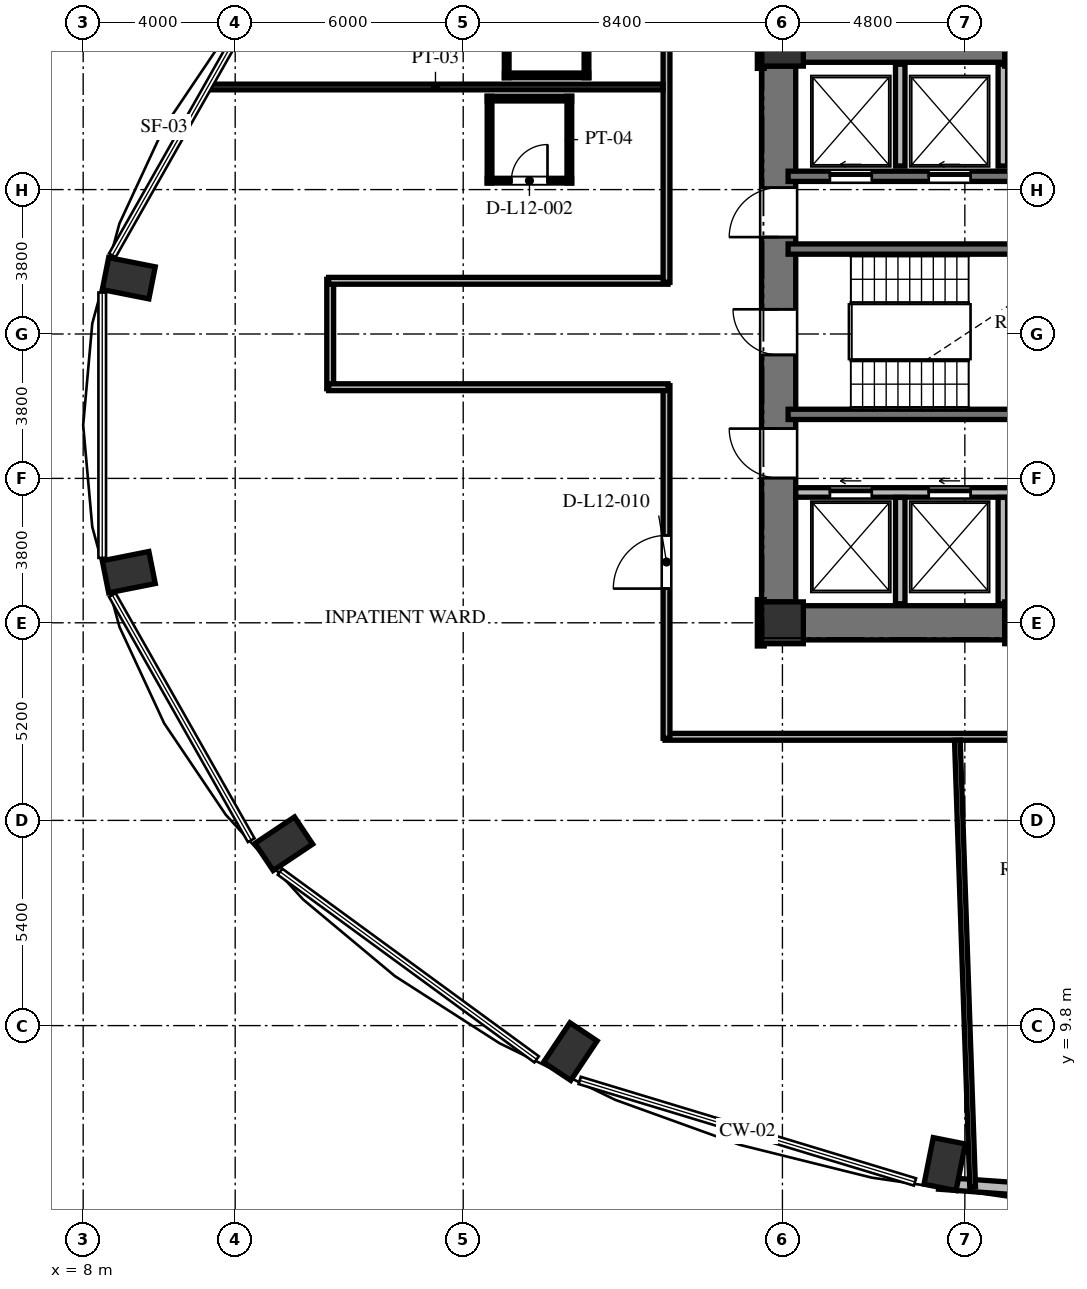
"""IFC4 building model, lengths in metres.
Left out: names, types, materials, properties, quantities, classifications, styles, units other than length and angle.
Written with IfcOpenShell. Run it as: python <this file> out.ifc"""

import sys

from ifc_helpers import new_model, si_unit, direction, frame, frame_2d, origin, origin_2d, place, context, subcontext, project, spatial, rectangle, extrude, element, fill, save


model = new_model("IFC4")
c1 = context("Model", 3, precision=1e-05, world=origin(), true_north=direction((0.0, 1.0)))
c2 = subcontext(c1, "Body", "Model", "MODEL_VIEW")
j1 = project(units=[si_unit("LENGTHUNIT", "METRE"), si_unit("PLANEANGLEUNIT", "RADIAN")], contexts=[c1])
p1 = place(None, origin())
s1 = spatial("IfcSite", under=j1, at=p1, CompositionType="ELEMENT")
p2 = place(p1, origin())
s2 = spatial("IfcBuilding", under=s1, at=p2, CompositionType="ELEMENT")
p3 = place(p2, frame((0.0, 0.0, 50.736)))
s3 = spatial("IfcBuildingStorey", under=s2, at=p3, CompositionType="ELEMENT", Elevation=50.736)
for number, where, z_axis, x_axis in (
    (1, (9.2, 29.468, 0.0), (0.0, 0.0, 1.0), (-0.981, 0.195, 0.0)),
    (2, (9.2, 21.732, 0.0), (0.0, 0.0, 1.0), (-0.981, -0.195, 0.0)),
    (3, (13.28, 14.586, 0.0), (0.0, 0.0, 1.0), (-0.831, -0.556, 0.0)),
    (4, (20.819, 9.116, 0.0), (0.0, 0.0, 1.0), (-0.556, -0.831, 0.0)),
    (5, (30.669, 6.156, 0.0), (0.0, 0.0, 1.0), (-0.195, -0.981, 0.0)),
):
    element("IfcColumn", number, at=place(p3, frame(where, z_axis=z_axis, x_axis=x_axis)), inside=s3, PredefinedType="COLUMN", context=c2, shape_type="SweptSolid", body=[
        extrude(rectangle(XDim=1.25, YDim=0.86, at=origin_2d()), origin(), (0.0, 0.0, 1.0), 3.648),
    ])
for number, where, z_axis, x_axis in (
    (6, (26.4, 20.4, 0.0), (0.0, 0.0, 1.0), (1.0, 0.0, 0.0)),
    (7, (32.8, 20.4, 0.0), (0.0, 0.0, 1.0), (1.0, 0.0, 0.0)),
    (8, (32.8, 35.6, 0.0), (0.0, 0.0, 1.0), (1.0, 0.0, 0.0)),
    (9, (26.4, 35.6, 0.0), (0.0, 0.0, 1.0), (1.0, 0.0, 0.0)),
):
    element("IfcColumn", number, at=place(p3, frame(where, z_axis=z_axis, x_axis=x_axis)), inside=s3, PredefinedType="COLUMN", context=c2, shape_type="SweptSolid", body=[
        extrude(rectangle(XDim=1.1, YDim=1.1, at=origin_2d()), origin(), (0.0, 0.0, 1.0), 3.648),
    ])
p4 = place(p3, frame((26.3, 20.95, 0.0), z_axis=(0.0, 0.0, 1.0), x_axis=(0.0, 1.0, 0.0)))
e10 = element("IfcWall", 10, at=p4, inside=s3, PredefinedType="SHEAR", context=c2, shape_type="SweptSolid", body=[
    extrude(rectangle(XDim=14.1, YDim=0.9, at=frame_2d((7.05, 0.0))), origin(), (0.0, 0.0, 1.0), 3.648),
])
p5 = place(p4, frame((6.5, 0.0, 0.0)))
e11 = element("IfcOpeningElement", 11, at=p5, cuts=e10, PredefinedType="OPENING", context=c2, shape_type="SweptSolid", body=[
    extrude(rectangle(XDim=1.2, YDim=2.15, at=frame_2d((0.6, 1.075))), frame((0.0, 0.46, 0.0), z_axis=(0.0, -1.0, 0.0), x_axis=(1.0, 0.0, 0.0)), (0.0, 0.0, 1.0), 0.92),
])
p6 = place(p4, frame((9.6, 0.0, 0.0)))
e12 = element("IfcOpeningElement", 12, at=p6, cuts=e10, PredefinedType="OPENING", context=c2, shape_type="SweptSolid", body=[
    extrude(rectangle(XDim=1.3, YDim=2.2, at=frame_2d((0.65, 1.1))), frame((0.0, 0.46, 0.0), z_axis=(0.0, -1.0, 0.0), x_axis=(1.0, 0.0, 0.0)), (0.0, 0.0, 1.0), 0.92),
])
p7 = place(p4, frame((3.26, 0.0, 0.0)))
e13 = element("IfcOpeningElement", 13, at=p7, cuts=e10, PredefinedType="OPENING", context=c2, shape_type="SweptSolid", body=[
    extrude(rectangle(XDim=1.3, YDim=2.2, at=frame_2d((0.65, 1.1))), frame((0.0, 0.46, 0.0), z_axis=(0.0, -1.0, 0.0), x_axis=(1.0, 0.0, 0.0)), (0.0, 0.0, 1.0), 0.92),
])
for number, where, z_axis, x_axis in (
    (14, (26.95, 20.4, 0.0), (0.0, 0.0, 1.0), (1.0, 0.0, 0.0)),
    (15, (26.95, 35.6, 0.0), (0.0, 0.0, 1.0), (1.0, 0.0, 0.0)),
):
    element("IfcWall", number, at=place(p3, frame(where, z_axis=z_axis, x_axis=x_axis)), inside=s3, PredefinedType="SHEAR", context=c2, shape_type="SweptSolid", body=[
        extrude(rectangle(XDim=5.3, YDim=0.9, at=frame_2d((2.65, 0.0))), origin(), (0.0, 0.0, 1.0), 3.648),
    ])
p8 = place(p3, frame((30.519, 5.654, 0.0), z_axis=(0.0, 0.0, 1.0), x_axis=(0.997421878774, -0.071760683825, 0.0)))
e16 = element("IfcWall", 16, at=p8, inside=s3, PredefinedType="SOLIDWALL", context=c2, shape_type="SweptSolid", body=[
    extrude(rectangle(XDim=5.675, YDim=0.32, at=frame_2d((2.837, 0.0))), origin(), (0.0, 0.0, 1.0), 3.428),
])
p9 = place(p8, frame((2.237, 0.0, 0.85)))
e17 = element("IfcOpeningElement", 17, at=p9, cuts=e16, PredefinedType="OPENING", context=c2, shape_type="SweptSolid", body=[
    extrude(rectangle(XDim=1.2, YDim=2.2, at=frame_2d((0.6, 1.1))), frame((0.0, 0.17, 0.0), z_axis=(0.0, -1.0, 0.0), x_axis=(1.0, 0.0, 0.0)), (0.0, 0.0, 1.0), 0.34),
])
for number, where, z_axis, x_axis in (
    (18, (26.55, 30.235, 0.0), (0.0, 0.0, 1.0), (1.0, 0.0, 0.0)),
    (19, (26.55, 25.885, 0.0), (0.0, 0.0, 1.0), (1.0, 0.0, 0.0)),
):
    element("IfcWall", number, at=place(p3, frame(where, z_axis=z_axis, x_axis=x_axis)), inside=s3, PredefinedType="SHEAR", context=c2, shape_type="SweptSolid", body=[
        extrude(rectangle(XDim=7.985, YDim=0.27, at=frame_2d((3.992, 0.0))), origin(), (0.0, 0.0, 1.0), 3.648),
    ])
p10 = place(p3, frame((26.55, 32.15, 0.0), z_axis=(0.0, 0.0, 1.0), x_axis=(1.0, 0.0, 0.0)))
e20 = element("IfcWall", 20, at=p10, inside=s3, PredefinedType="SHEAR", context=c2, shape_type="SweptSolid", body=[
    extrude(rectangle(XDim=16.4, YDim=0.27, at=frame_2d((8.2, 0.0))), origin(), (0.0, 0.0, 1.0), 3.648),
])
p11 = place(p10, frame((1.1, 0.0, 0.0)))
e21 = element("IfcOpeningElement", 21, at=p11, cuts=e20, PredefinedType="OPENING", context=c2, shape_type="SweptSolid", body=[
    extrude(rectangle(XDim=1.1, YDim=2.2, at=frame_2d((0.55, 1.1))), frame((0.0, 0.145, 0.0), z_axis=(0.0, -1.0, 0.0), x_axis=(1.0, 0.0, 0.0)), (0.0, 0.0, 1.0), 0.29),
])
p12 = place(p10, frame((3.7, 0.0, 0.0)))
e22 = element("IfcOpeningElement", 22, at=p12, cuts=e20, PredefinedType="OPENING", context=c2, shape_type="SweptSolid", body=[
    extrude(rectangle(XDim=1.1, YDim=2.2, at=frame_2d((0.55, 1.1))), frame((0.0, 0.145, 0.0), z_axis=(0.0, -1.0, 0.0), x_axis=(1.0, 0.0, 0.0)), (0.0, 0.0, 1.0), 0.29),
])
p13 = place(p10, frame((6.5, 0.0, 0.0)))
e23 = element("IfcOpeningElement", 23, at=p13, cuts=e20, PredefinedType="OPENING", context=c2, shape_type="SweptSolid", body=[
    extrude(rectangle(XDim=1.1, YDim=2.2, at=frame_2d((0.55, 1.1))), frame((0.0, 0.145, 0.0), z_axis=(0.0, -1.0, 0.0), x_axis=(1.0, 0.0, 0.0)), (0.0, 0.0, 1.0), 0.29),
])
p14 = place(p10, frame((9.1, 0.0, 0.0)))
e24 = element("IfcOpeningElement", 24, at=p14, cuts=e20, PredefinedType="OPENING", context=c2, shape_type="SweptSolid", body=[
    extrude(rectangle(XDim=1.1, YDim=2.2, at=frame_2d((0.55, 1.1))), frame((0.0, 0.145, 0.0), z_axis=(0.0, -1.0, 0.0), x_axis=(1.0, 0.0, 0.0)), (0.0, 0.0, 1.0), 0.29),
])
p15 = place(p10, frame((11.9, 0.0, 0.0)))
e25 = element("IfcOpeningElement", 25, at=p15, cuts=e20, PredefinedType="OPENING", context=c2, shape_type="SweptSolid", body=[
    extrude(rectangle(XDim=1.1, YDim=2.2, at=frame_2d((0.55, 1.1))), frame((0.0, 0.145, 0.0), z_axis=(0.0, -1.0, 0.0), x_axis=(1.0, 0.0, 0.0)), (0.0, 0.0, 1.0), 0.29),
])
p16 = place(p10, frame((14.5, 0.0, 0.0)))
e26 = element("IfcOpeningElement", 26, at=p16, cuts=e20, PredefinedType="OPENING", context=c2, shape_type="SweptSolid", body=[
    extrude(rectangle(XDim=1.1, YDim=2.2, at=frame_2d((0.55, 1.1))), frame((0.0, 0.145, 0.0), z_axis=(0.0, -1.0, 0.0), x_axis=(1.0, 0.0, 0.0)), (0.0, 0.0, 1.0), 0.29),
])
p17 = place(p3, frame((26.75, 23.83, 0.0), z_axis=(0.0, 0.0, 1.0), x_axis=(1.0, 0.0, 0.0)))
e27 = element("IfcWall", 27, at=p17, inside=s3, PredefinedType="SOLIDWALL", context=c2, shape_type="SweptSolid", body=[
    extrude(rectangle(XDim=16.2, YDim=0.25, at=frame_2d((8.1, 0.0))), origin(), (0.0, 0.0, 1.0), 3.428),
])
p18 = place(p17, frame((0.9, 0.0, 0.0)))
e28 = element("IfcOpeningElement", 28, at=p18, cuts=e27, PredefinedType="OPENING", context=c2, shape_type="SweptSolid", body=[
    extrude(rectangle(XDim=1.1, YDim=2.2, at=frame_2d((0.55, 1.1))), frame((0.0, 0.135, 0.0), z_axis=(0.0, -1.0, 0.0), x_axis=(1.0, 0.0, 0.0)), (0.0, 0.0, 1.0), 0.27),
])
p19 = place(p17, frame((3.5, 0.0, 0.0)))
e29 = element("IfcOpeningElement", 29, at=p19, cuts=e27, PredefinedType="OPENING", context=c2, shape_type="SweptSolid", body=[
    extrude(rectangle(XDim=1.1, YDim=2.2, at=frame_2d((0.55, 1.1))), frame((0.0, 0.135, 0.0), z_axis=(0.0, -1.0, 0.0), x_axis=(1.0, 0.0, 0.0)), (0.0, 0.0, 1.0), 0.27),
])
p20 = place(p17, frame((6.3, 0.0, 0.0)))
e30 = element("IfcOpeningElement", 30, at=p20, cuts=e27, PredefinedType="OPENING", context=c2, shape_type="SweptSolid", body=[
    extrude(rectangle(XDim=1.1, YDim=2.2, at=frame_2d((0.55, 1.1))), frame((0.0, 0.135, 0.0), z_axis=(0.0, -1.0, 0.0), x_axis=(1.0, 0.0, 0.0)), (0.0, 0.0, 1.0), 0.27),
])
p21 = place(p17, frame((8.9, 0.0, 0.0)))
e31 = element("IfcOpeningElement", 31, at=p21, cuts=e27, PredefinedType="OPENING", context=c2, shape_type="SweptSolid", body=[
    extrude(rectangle(XDim=1.1, YDim=2.2, at=frame_2d((0.55, 1.1))), frame((0.0, 0.135, 0.0), z_axis=(0.0, -1.0, 0.0), x_axis=(1.0, 0.0, 0.0)), (0.0, 0.0, 1.0), 0.27),
])
p22 = place(p17, frame((11.7, 0.0, 0.0)))
e32 = element("IfcOpeningElement", 32, at=p22, cuts=e27, PredefinedType="OPENING", context=c2, shape_type="SweptSolid", body=[
    extrude(rectangle(XDim=1.1, YDim=2.2, at=frame_2d((0.55, 1.1))), frame((0.0, 0.135, 0.0), z_axis=(0.0, -1.0, 0.0), x_axis=(1.0, 0.0, 0.0)), (0.0, 0.0, 1.0), 0.27),
])
p23 = place(p17, frame((14.15, 0.0, 0.0)))
e33 = element("IfcOpeningElement", 33, at=p23, cuts=e27, PredefinedType="OPENING", context=c2, shape_type="SweptSolid", body=[
    extrude(rectangle(XDim=1.4, YDim=2.3, at=frame_2d((0.7, 1.15))), frame((0.0, 0.135, 0.0), z_axis=(0.0, -1.0, 0.0), x_axis=(1.0, 0.0, 0.0)), (0.0, 0.0, 1.0), 0.27),
])
p24 = place(p3, frame((29.5, 32.42, 0.0), z_axis=(0.0, 0.0, 1.0), x_axis=(0.0, 1.0, 0.0)))
e34 = element("IfcWall", 34, at=p24, inside=s3, PredefinedType="SOLIDWALL", context=c2, shape_type="SweptSolid", body=[
    extrude(rectangle(XDim=2.68, YDim=0.25, at=frame_2d((1.34, 0.0))), origin(), (0.0, 0.0, 1.0), 3.428),
])
p25 = place(p3, frame((29.5, 20.9, 0.0), z_axis=(0.0, 0.0, 1.0), x_axis=(0.0, 1.0, 0.0)))
e35 = element("IfcWall", 35, at=p25, inside=s3, PredefinedType="SOLIDWALL", context=c2, shape_type="SweptSolid", body=[
    extrude(rectangle(XDim=2.8, YDim=0.25, at=frame_2d((1.4, 0.0))), origin(), (0.0, 0.0, 1.0), 3.428),
])
p26 = place(p3, frame((32.2, 32.42, 0.0), z_axis=(0.0, 0.0, 1.0), x_axis=(0.0, 1.0, 0.0)))
e36 = element("IfcWall", 36, at=p26, inside=s3, PredefinedType="SOLIDWALL", context=c2, shape_type="SweptSolid", body=[
    extrude(rectangle(XDim=2.68, YDim=0.25, at=frame_2d((1.34, 0.0))), origin(), (0.0, 0.0, 1.0), 3.428),
])
p27 = place(p3, frame((32.2, 20.9, 0.0), z_axis=(0.0, 0.0, 1.0), x_axis=(0.0, 1.0, 0.0)))
e37 = element("IfcWall", 37, at=p27, inside=s3, PredefinedType="SOLIDWALL", context=c2, shape_type="SweptSolid", body=[
    extrude(rectangle(XDim=2.8, YDim=0.25, at=frame_2d((1.4, 0.0))), origin(), (0.0, 0.0, 1.0), 3.428),
])
p28 = place(p3, frame((14.5, 26.56, 0.0), z_axis=(0.0, 0.0, 1.0), x_axis=(0.0, 1.0, 0.0)))
e38 = element("IfcWall", 38, at=p28, inside=s3, PredefinedType="PARTITIONING", context=c2, shape_type="SweptSolid", body=[
    extrude(rectangle(XDim=2.88, YDim=0.18, at=frame_2d((1.44, 0.0))), origin(), (0.0, 0.0, 1.0), 3.428),
])
p29 = place(p3, frame((14.46, 29.4, 0.0), z_axis=(0.0, 0.0, 1.0), x_axis=(1.0, 0.0, 0.0)))
e39 = element("IfcWall", 39, at=p29, inside=s3, PredefinedType="PARTITIONING", context=c2, shape_type="SweptSolid", body=[
    extrude(rectangle(XDim=8.93, YDim=0.18, at=frame_2d((4.465, 0.0))), origin(), (0.0, 0.0, 1.0), 3.428),
])
p30 = place(p3, frame((23.35, 29.36, 0.0), z_axis=(0.0, 0.0, 1.0), x_axis=(0.0, 1.0, 0.0)))
e40 = element("IfcWall", 40, at=p30, inside=s3, PredefinedType="PARTITIONING", context=c2, shape_type="SweptSolid", body=[
    extrude(rectangle(XDim=9.43, YDim=0.18, at=frame_2d((4.715, 0.0))), origin(), (0.0, 0.0, 1.0), 3.428),
])
for number, where, z_axis, x_axis in (
    (41, (25.83, 36.21, 0.0), (0.0, 0.0, 1.0), (0.0, -1.0, 0.0)),
    (42, (25.83, 21.01, 0.0), (0.0, 0.0, 1.0), (0.0, -1.0, 0.0)),
):
    element("IfcWall", number, at=place(p3, frame(where, z_axis=z_axis, x_axis=x_axis)), inside=s3, PredefinedType="PARTITIONING", context=c2, shape_type="SweptSolid", body=[
        extrude(rectangle(XDim=1.22, YDim=0.18, at=frame_2d((0.61, 0.0))), origin(), (0.0, 0.0, 1.0), 3.428),
    ])
p31 = place(p3, frame((45.24, 17.4, 0.0), z_axis=(0.0, 0.0, 1.0), x_axis=(-1.0, 0.0, 0.0)))
e43 = element("IfcWall", 43, at=p31, inside=s3, PredefinedType="PARTITIONING", context=c2, shape_type="SweptSolid", body=[
    extrude(rectangle(XDim=21.93, YDim=0.18, at=frame_2d((10.965, 0.0))), origin(), (0.0, 0.0, 1.0), 3.053),
])
p32 = place(p31, frame((9.289, 0.0, 0.0)))
e44 = element("IfcOpeningElement", 44, at=p32, cuts=e43, PredefinedType="OPENING", context=c2, shape_type="SweptSolid", body=[
    extrude(rectangle(XDim=1.4, YDim=2.2, at=frame_2d((0.7, 1.1))), frame((0.0, 0.1, 0.0), z_axis=(0.0, -1.0, 0.0), x_axis=(1.0, 0.0, 0.0)), (0.0, 0.0, 1.0), 0.2),
])
p33 = place(p31, frame((2.329, 0.0, 0.0)))
e45 = element("IfcOpeningElement", 45, at=p33, cuts=e43, PredefinedType="OPENING", context=c2, shape_type="SweptSolid", body=[
    extrude(rectangle(XDim=1.4, YDim=2.2, at=frame_2d((0.7, 1.1))), frame((0.0, 0.1, 0.0), z_axis=(0.0, -1.0, 0.0), x_axis=(1.0, 0.0, 0.0)), (0.0, 0.0, 1.0), 0.2),
])
p34 = place(p3, frame((23.35, 17.36, 0.0), z_axis=(0.0, 0.0, 1.0), x_axis=(0.0, 1.0, 0.0)))
e46 = element("IfcWall", 46, at=p34, inside=s3, PredefinedType="PARTITIONING", context=c2, shape_type="SweptSolid", body=[
    extrude(rectangle(XDim=9.28, YDim=0.18, at=frame_2d((4.64, 0.0))), origin(), (0.0, 0.0, 1.0), 3.428),
])
p35 = place(p34, frame((3.94, 0.0, 0.0)))
e47 = element("IfcOpeningElement", 47, at=p35, cuts=e46, PredefinedType="OPENING", context=c2, shape_type="SweptSolid", body=[
    extrude(rectangle(XDim=1.4, YDim=2.2, at=frame_2d((0.7, 1.1))), frame((0.0, 0.1, 0.0), z_axis=(0.0, -1.0, 0.0), x_axis=(1.0, 0.0, 0.0)), (0.0, 0.0, 1.0), 0.2),
])
p36 = place(p3, frame((23.39, 26.6, 0.0), z_axis=(0.0, 0.0, 1.0), x_axis=(-1.0, 0.0, 0.0)))
e48 = element("IfcWall", 48, at=p36, inside=s3, PredefinedType="PARTITIONING", context=c2, shape_type="SweptSolid", body=[
    extrude(rectangle(XDim=8.93, YDim=0.18, at=frame_2d((4.465, 0.0))), origin(), (0.0, 0.0, 1.0), 3.428),
])
p37 = place(p3, frame((11.281, 34.5, 0.0), z_axis=(0.0, 0.0, 1.0), x_axis=(1.0, 0.0, 0.0)))
e49 = element("IfcWall", 49, at=p37, inside=s3, PredefinedType="PARTITIONING", context=c2, shape_type="SweptSolid", body=[
    extrude(rectangle(XDim=11.979, YDim=0.15, at=frame_2d((5.99, 0.0))), origin(), (0.0, 0.0, 1.0), 3.428),
])
p38 = place(p3, frame((31.405, 5.559, 0.0), z_axis=(0.0, 0.0, 1.0), x_axis=(-0.034219123574, 0.9994143543, 0.0)))
e50 = element("IfcWall", 50, at=p38, inside=s3, PredefinedType="PARTITIONING", context=c2, shape_type="SweptSolid", body=[
    extrude(rectangle(XDim=11.758, YDim=0.15, at=frame_2d((5.879, 0.0))), origin(), (0.0, 0.0, 1.0), 2.813),
])
p39 = place(p3, frame((18.633, 34.195, 0.0), z_axis=(0.0, 0.0, 1.0), x_axis=(1.0, 0.0, 0.0)))
e51 = element("IfcWall", 51, at=p39, inside=s3, PredefinedType="PARTITIONING", context=c2, shape_type="SweptSolid", body=[
    extrude(rectangle(XDim=2.22, YDim=0.125, at=frame_2d((1.11, 0.0))), origin(), (0.0, 0.0, 1.0), 3.428),
])
p40 = place(p3, frame((18.633, 32.035, 0.0), z_axis=(0.0, 0.0, 1.0), x_axis=(1.0, 0.0, 0.0)))
e52 = element("IfcWall", 52, at=p40, inside=s3, PredefinedType="PARTITIONING", context=c2, shape_type="SweptSolid", body=[
    extrude(rectangle(XDim=2.22, YDim=0.125, at=frame_2d((1.11, 0.0))), origin(), (0.0, 0.0, 1.0), 3.428),
])
p41 = place(p40, frame((0.635, 0.0, 0.0)))
e53 = element("IfcOpeningElement", 53, at=p41, cuts=e52, PredefinedType="OPENING", context=c2, shape_type="SweptSolid", body=[
    extrude(rectangle(XDim=0.95, YDim=2.1, at=frame_2d((0.475, 1.05))), frame((0.0, 0.073, 0.0), z_axis=(0.0, -1.0, 0.0), x_axis=(1.0, 0.0, 0.0)), (0.0, 0.0, 1.0), 0.145),
])
for number, where, z_axis, x_axis in (
    (54, (20.793, 31.975, 0.0), (0.0, 0.0, 1.0), (0.0, 1.0, 0.0)),
    (55, (18.693, 31.975, 0.0), (0.0, 0.0, 1.0), (0.0, 1.0, 0.0)),
):
    element("IfcWall", number, at=place(p3, frame(where, z_axis=z_axis, x_axis=x_axis)), inside=s3, PredefinedType="PARTITIONING", context=c2, shape_type="SweptSolid", body=[
        extrude(rectangle(XDim=2.28, YDim=0.125, at=frame_2d((1.14, 0.0))), origin(), (0.0, 0.0, 1.0), 3.428),
    ])
p42 = place(p3, frame((19.084, 34.805, 0.0), z_axis=(0.0, 0.0, 1.0), x_axis=(1.0, 0.0, 0.0)))
e56 = element("IfcWall", 56, at=p42, inside=s3, PredefinedType="PARTITIONING", context=c2, shape_type="SweptSolid", body=[
    extrude(rectangle(XDim=2.22, YDim=0.125, at=frame_2d((1.11, 0.0))), origin(), (0.0, 0.0, 1.0), 3.428),
])
for number, where, z_axis, x_axis in (
    (57, (21.244, 34.745, 0.0), (0.0, 0.0, 1.0), (0.0, 1.0, 0.0)),
    (58, (19.144, 34.745, 0.0), (0.0, 0.0, 1.0), (0.0, 1.0, 0.0)),
):
    element("IfcWall", number, at=place(p3, frame(where, z_axis=z_axis, x_axis=x_axis)), inside=s3, PredefinedType="PARTITIONING", context=c2, shape_type="SweptSolid", body=[
        extrude(rectangle(XDim=2.28, YDim=0.125, at=frame_2d((1.14, 0.0))), origin(), (0.0, 0.0, 1.0), 3.428),
    ])
p43 = place(p5, origin())
e59 = element("IfcDoor", 59, at=p43, inside=s3, OperationType="SINGLE_SWING_RIGHT", PredefinedType="DOOR", context=c2, shape_type="SweptSolid", body=[
    extrude(rectangle(XDim=1.2, YDim=2.15, at=frame_2d((0.6, 1.075))), frame((0.0, 0.025, 0.0), z_axis=(0.0, -1.0, 0.0), x_axis=(1.0, 0.0, 0.0)), (0.0, 0.0, 1.0), 0.05),
])
fill(e11, e59)
p44 = place(p6, origin())
e60 = element("IfcDoor", 60, at=p44, inside=s3, OperationType="SINGLE_SWING_LEFT", PredefinedType="DOOR", context=c2, shape_type="SweptSolid", body=[
    extrude(rectangle(XDim=1.3, YDim=2.2, at=frame_2d((0.65, 1.1))), frame((0.0, 0.025, 0.0), z_axis=(0.0, -1.0, 0.0), x_axis=(1.0, 0.0, 0.0)), (0.0, 0.0, 1.0), 0.05),
])
fill(e12, e60)
p45 = place(p7, origin())
e61 = element("IfcDoor", 61, at=p45, inside=s3, OperationType="SINGLE_SWING_RIGHT", PredefinedType="DOOR", context=c2, shape_type="SweptSolid", body=[
    extrude(rectangle(XDim=1.3, YDim=2.2, at=frame_2d((0.65, 1.1))), frame((0.0, 0.025, 0.0), z_axis=(0.0, -1.0, 0.0), x_axis=(1.0, 0.0, 0.0)), (0.0, 0.0, 1.0), 0.05),
])
fill(e13, e61)
p46 = place(p11, origin())
e62 = element("IfcDoor", 62, at=p46, inside=s3, OperationType="SLIDING_TO_LEFT", PredefinedType="DOOR", context=c2, shape_type="SweptSolid", body=[
    extrude(rectangle(XDim=1.1, YDim=2.2, at=frame_2d((0.55, 1.1))), frame((0.0, 0.025, 0.0), z_axis=(0.0, -1.0, 0.0), x_axis=(1.0, 0.0, 0.0)), (0.0, 0.0, 1.0), 0.05),
])
fill(e21, e62)
p47 = place(p12, origin())
e63 = element("IfcDoor", 63, at=p47, inside=s3, OperationType="SLIDING_TO_LEFT", PredefinedType="DOOR", context=c2, shape_type="SweptSolid", body=[
    extrude(rectangle(XDim=1.1, YDim=2.2, at=frame_2d((0.55, 1.1))), frame((0.0, 0.025, 0.0), z_axis=(0.0, -1.0, 0.0), x_axis=(1.0, 0.0, 0.0)), (0.0, 0.0, 1.0), 0.05),
])
fill(e22, e63)
p48 = place(p18, origin())
e64 = element("IfcDoor", 64, at=p48, inside=s3, OperationType="SLIDING_TO_LEFT", PredefinedType="DOOR", context=c2, shape_type="SweptSolid", body=[
    extrude(rectangle(XDim=1.1, YDim=2.2, at=frame_2d((0.55, 1.1))), frame((0.0, 0.025, 0.0), z_axis=(0.0, -1.0, 0.0), x_axis=(1.0, 0.0, 0.0)), (0.0, 0.0, 1.0), 0.05),
])
fill(e28, e64)
p49 = place(p19, origin())
e65 = element("IfcDoor", 65, at=p49, inside=s3, OperationType="SLIDING_TO_LEFT", PredefinedType="DOOR", context=c2, shape_type="SweptSolid", body=[
    extrude(rectangle(XDim=1.1, YDim=2.2, at=frame_2d((0.55, 1.1))), frame((0.0, 0.025, 0.0), z_axis=(0.0, -1.0, 0.0), x_axis=(1.0, 0.0, 0.0)), (0.0, 0.0, 1.0), 0.05),
])
fill(e29, e65)
p50 = place(p41, origin())
e66 = element("IfcDoor", 66, at=p50, inside=s3, OperationType="SINGLE_SWING_RIGHT", PredefinedType="DOOR", context=c2, shape_type="SweptSolid", body=[
    extrude(rectangle(XDim=0.95, YDim=2.1, at=frame_2d((0.475, 1.05))), frame((0.0, 0.025, 0.0), z_axis=(0.0, -1.0, 0.0), x_axis=(1.0, 0.0, 0.0)), (0.0, 0.0, 1.0), 0.05),
])
fill(e53, e66)
p51 = place(p35, origin())
e67 = element("IfcDoor", 67, at=p51, inside=s3, OperationType="SINGLE_SWING_LEFT", PredefinedType="DOOR", context=c2, shape_type="SweptSolid", body=[
    extrude(rectangle(XDim=1.4, YDim=2.2, at=frame_2d((0.7, 1.1))), frame((0.0, 0.025, 0.0), z_axis=(0.0, -1.0, 0.0), x_axis=(1.0, 0.0, 0.0)), (0.0, 0.0, 1.0), 0.05),
])
fill(e47, e67)
save(model, sys.argv[1])
